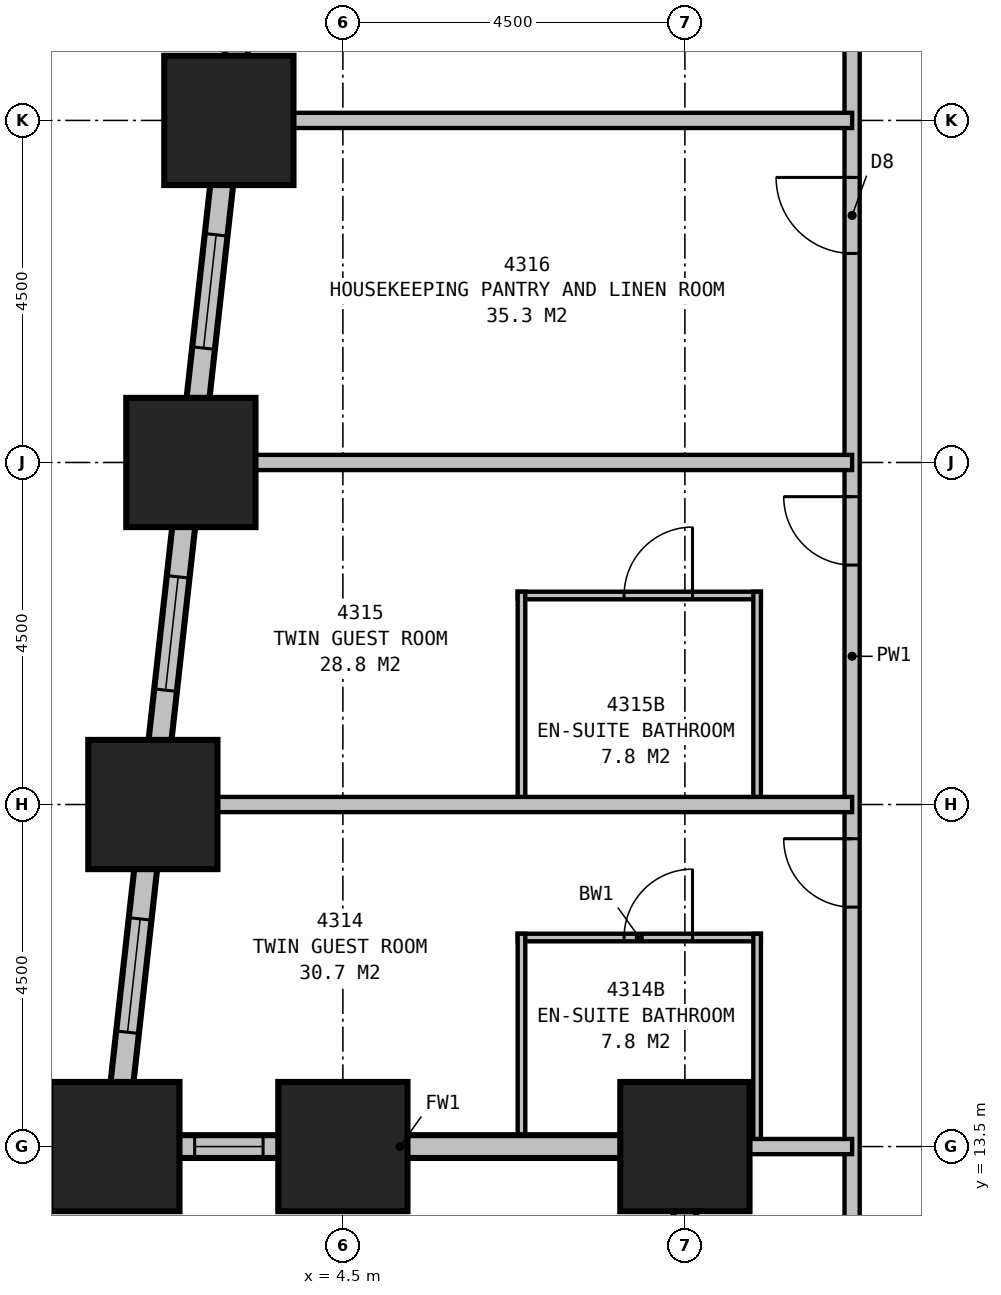
"""IFC4 building model, lengths in metres.
Left out: names, types, materials, properties, quantities, classifications, styles, units other than length and angle.
Written with IfcOpenShell. Run it as: python <this file> out.ifc"""

import sys

from ifc_helpers import new_model, si_unit, direction, frame, frame_2d, origin, origin_2d, place, context, subcontext, project, spatial, rectangle, extrude, element, fill, save


model = new_model("IFC4")
c1 = context("Model", 3, precision=1e-05, world=origin(), true_north=direction((0.0, 1.0)))
c2 = subcontext(c1, "Body", "Model", "MODEL_VIEW")
j1 = project(units=[si_unit("LENGTHUNIT", "METRE"), si_unit("PLANEANGLEUNIT", "RADIAN")], contexts=[c1])
p1 = place(None, origin())
s1 = spatial("IfcSite", under=j1, at=p1, CompositionType="ELEMENT")
p2 = place(p1, origin())
s2 = spatial("IfcBuilding", under=s1, at=p2, CompositionType="ELEMENT")
p3 = place(p2, frame((0.0, 0.0, 169.4)))
s3 = spatial("IfcBuildingStorey", under=s2, at=p3, CompositionType="ELEMENT", Elevation=169.4)
for number, where, z_axis, x_axis in (
    (1, (1.5, 13.5, 0.0), (0.0, 0.0, 1.0), (1.0, 0.0, 0.0)),
    (2, (4.5, 13.5, 0.0), (0.0, 0.0, 1.0), (1.0, 0.0, 0.0)),
    (3, (9.0, 13.5, 0.0), (0.0, 0.0, 1.0), (1.0, 0.0, 0.0)),
    (4, (3.0, 27.0, 0.0), (0.0, 0.0, 1.0), (1.0, 0.0, 0.0)),
    (5, (2.5, 22.5, 0.0), (0.0, 0.0, 1.0), (1.0, 0.0, 0.0)),
    (6, (2.0, 18.0, 0.0), (0.0, 0.0, 1.0), (1.0, 0.0, 0.0)),
):
    element("IfcColumn", number, at=place(p3, frame(where, z_axis=z_axis, x_axis=x_axis)), inside=s3, PredefinedType="COLUMN", context=c2, shape_type="SweptSolid", body=[
        extrude(rectangle(XDim=1.7, YDim=1.7, at=origin_2d()), origin(), (0.0, 0.0, 1.0), 3.5),
    ])
p4 = place(p3, frame((1.35, 13.5, 0.0), z_axis=(0.0, 0.0, 1.0), x_axis=(1.0, 0.0, 0.0)))
e7 = element("IfcWall", 7, at=p4, inside=s3, PredefinedType="STANDARD", context=c2, shape_type="SweptSolid", body=[
    extrude(rectangle(XDim=7.8, YDim=0.3, at=frame_2d((3.9, 0.0))), origin(), (0.0, 0.0, 1.0), 2.25),
])
p5 = place(p4, frame((1.2, 0.0, 0.5)))
e8 = element("IfcOpeningElement", 8, at=p5, cuts=e7, PredefinedType="OPENING", context=c2, shape_type="SweptSolid", body=[
    extrude(rectangle(XDim=0.9, YDim=1.6, at=frame_2d((0.45, 0.8))), frame((0.0, 0.16, 0.0), z_axis=(0.0, -1.0, 0.0), x_axis=(1.0, 0.0, 0.0)), (0.0, 0.0, 1.0), 0.32),
])
p6 = place(p3, frame((9.0, 13.65, 0.0), z_axis=(0.0, 0.0, 1.0), x_axis=(0.0, -1.0, 0.0)))
e9 = element("IfcWall", 9, at=p6, inside=s3, PredefinedType="STANDARD", context=c2, shape_type="SweptSolid", body=[
    extrude(rectangle(XDim=13.8, YDim=0.3, at=frame_2d((6.9, 0.0))), origin(), (0.0, 0.0, 1.0), 2.25),
])
p7 = place(p6, frame((1.2, 0.0, 0.5)))
e10 = element("IfcOpeningElement", 10, at=p7, cuts=e9, PredefinedType="OPENING", context=c2, shape_type="SweptSolid", body=[
    extrude(rectangle(XDim=2.4, YDim=1.6, at=frame_2d((1.2, 0.8))), frame((0.0, 0.16, 0.0), z_axis=(0.0, -1.0, 0.0), x_axis=(1.0, 0.0, 0.0)), (0.0, 0.0, 1.0), 0.32),
])
p8 = place(p6, frame((5.7, 0.0, 0.5)))
e11 = element("IfcOpeningElement", 11, at=p8, cuts=e9, PredefinedType="OPENING", context=c2, shape_type="SweptSolid", body=[
    extrude(rectangle(XDim=2.4, YDim=1.6, at=frame_2d((1.2, 0.8))), frame((0.0, 0.16, 0.0), z_axis=(0.0, -1.0, 0.0), x_axis=(1.0, 0.0, 0.0)), (0.0, 0.0, 1.0), 0.32),
])
p9 = place(p6, frame((10.2, 0.0, 0.5)))
e12 = element("IfcOpeningElement", 12, at=p9, cuts=e9, PredefinedType="OPENING", context=c2, shape_type="SweptSolid", body=[
    extrude(rectangle(XDim=2.4, YDim=1.6, at=frame_2d((1.2, 0.8))), frame((0.0, 0.16, 0.0), z_axis=(0.0, -1.0, 0.0), x_axis=(1.0, 0.0, 0.0)), (0.0, 0.0, 1.0), 0.32),
])
p10 = place(p3, frame((4.017, 36.149, 0.0), z_axis=(0.0, 0.0, 1.0), x_axis=(-0.110433862387, -0.993883475081, 0.0)))
e13 = element("IfcWall", 13, at=p10, inside=s3, PredefinedType="STANDARD", context=c2, shape_type="SweptSolid", body=[
    extrude(rectangle(XDim=22.939, YDim=0.3, at=frame_2d((11.469, 0.0))), origin(), (0.0, 0.0, 1.0), 2.25),
])
p11 = place(p10, frame((1.664, 0.0, 0.5)))
e14 = element("IfcOpeningElement", 14, at=p11, cuts=e13, PredefinedType="OPENING", context=c2, shape_type="SweptSolid", body=[
    extrude(rectangle(XDim=1.5, YDim=1.6, at=frame_2d((0.75, 0.8))), frame((0.0, 0.16, 0.0), z_axis=(0.0, -1.0, 0.0), x_axis=(1.0, 0.0, 0.0)), (0.0, 0.0, 1.0), 0.32),
])
p12 = place(p10, frame((6.192, 0.0, 0.5)))
e15 = element("IfcOpeningElement", 15, at=p12, cuts=e13, PredefinedType="OPENING", context=c2, shape_type="SweptSolid", body=[
    extrude(rectangle(XDim=1.5, YDim=1.6, at=frame_2d((0.75, 0.8))), frame((0.0, 0.16, 0.0), z_axis=(0.0, -1.0, 0.0), x_axis=(1.0, 0.0, 0.0)), (0.0, 0.0, 1.0), 0.32),
])
p13 = place(p10, frame((10.719, 0.0, 0.5)))
e16 = element("IfcOpeningElement", 16, at=p13, cuts=e13, PredefinedType="OPENING", context=c2, shape_type="SweptSolid", body=[
    extrude(rectangle(XDim=1.5, YDim=1.6, at=frame_2d((0.75, 0.8))), frame((0.0, 0.16, 0.0), z_axis=(0.0, -1.0, 0.0), x_axis=(1.0, 0.0, 0.0)), (0.0, 0.0, 1.0), 0.32),
])
p14 = place(p10, frame((15.247, 0.0, 0.5)))
e17 = element("IfcOpeningElement", 17, at=p14, cuts=e13, PredefinedType="OPENING", context=c2, shape_type="SweptSolid", body=[
    extrude(rectangle(XDim=1.5, YDim=1.6, at=frame_2d((0.75, 0.8))), frame((0.0, 0.16, 0.0), z_axis=(0.0, -1.0, 0.0), x_axis=(1.0, 0.0, 0.0)), (0.0, 0.0, 1.0), 0.32),
])
p15 = place(p10, frame((19.775, 0.0, 0.5)))
e18 = element("IfcOpeningElement", 18, at=p15, cuts=e13, PredefinedType="OPENING", context=c2, shape_type="SweptSolid", body=[
    extrude(rectangle(XDim=1.5, YDim=1.6, at=frame_2d((0.75, 0.8))), frame((0.0, 0.16, 0.0), z_axis=(0.0, -1.0, 0.0), x_axis=(1.0, 0.0, 0.0)), (0.0, 0.0, 1.0), 0.32),
])
p16 = place(p3, frame((11.2, 10.6, 0.0), z_axis=(0.0, 0.0, 1.0), x_axis=(0.0, 1.0, 0.0)))
e19 = element("IfcWall", 19, at=p16, inside=s3, PredefinedType="PARTITIONING", context=c2, shape_type="SweptSolid", body=[
    extrude(rectangle(XDim=18.7, YDim=0.2, at=frame_2d((9.35, 0.0))), origin(), (0.0, 0.0, 1.0), 3.25),
])
p17 = place(p16, frame((6.05, 0.0, 0.0)))
e20 = element("IfcOpeningElement", 20, at=p17, cuts=e19, PredefinedType="OPENING", context=c2, shape_type="SweptSolid", body=[
    extrude(rectangle(XDim=0.9, YDim=2.1, at=frame_2d((0.45, 1.05))), frame((0.0, 0.11, 0.0), z_axis=(0.0, -1.0, 0.0), x_axis=(1.0, 0.0, 0.0)), (0.0, 0.0, 1.0), 0.22),
])
p18 = place(p16, frame((10.55, 0.0, 0.0)))
e21 = element("IfcOpeningElement", 21, at=p18, cuts=e19, PredefinedType="OPENING", context=c2, shape_type="SweptSolid", body=[
    extrude(rectangle(XDim=0.9, YDim=2.1, at=frame_2d((0.45, 1.05))), frame((0.0, 0.11, 0.0), z_axis=(0.0, -1.0, 0.0), x_axis=(1.0, 0.0, 0.0)), (0.0, 0.0, 1.0), 0.22),
])
p19 = place(p16, frame((14.65, 0.0, 0.0)))
e22 = element("IfcOpeningElement", 22, at=p19, cuts=e19, PredefinedType="OPENING", context=c2, shape_type="SweptSolid", body=[
    extrude(rectangle(XDim=1.0, YDim=2.1, at=frame_2d((0.5, 1.05))), frame((0.0, 0.11, 0.0), z_axis=(0.0, -1.0, 0.0), x_axis=(1.0, 0.0, 0.0)), (0.0, 0.0, 1.0), 0.22),
])
p20 = place(p3, frame((11.2, 18.0, 0.0), z_axis=(0.0, 0.0, 1.0), x_axis=(-1.0, 0.0, 0.0)))
e23 = element("IfcWall", 23, at=p20, inside=s3, PredefinedType="PARTITIONING", context=c2, shape_type="SweptSolid", body=[
    extrude(rectangle(XDim=9.199, YDim=0.2, at=frame_2d((4.6, 0.0))), origin(), (0.0, 0.0, 1.0), 2.25),
])
p21 = place(p3, frame((11.2, 22.5, 0.0), z_axis=(0.0, 0.0, 1.0), x_axis=(-1.0, 0.0, 0.0)))
e24 = element("IfcWall", 24, at=p21, inside=s3, PredefinedType="PARTITIONING", context=c2, shape_type="SweptSolid", body=[
    extrude(rectangle(XDim=8.699, YDim=0.2, at=frame_2d((4.35, 0.0))), origin(), (0.0, 0.0, 1.0), 2.25),
])
for number, where, z_axis, x_axis in (
    (25, (9.95, 13.5, 0.0), (0.0, 0.0, 1.0), (0.0, 1.0, 0.0)),
    (26, (6.85, 13.5, 0.0), (0.0, 0.0, 1.0), (0.0, 1.0, 0.0)),
):
    element("IfcWall", number, at=place(p3, frame(where, z_axis=z_axis, x_axis=x_axis)), inside=s3, PredefinedType="PLUMBINGWALL", context=c2, shape_type="SweptSolid", body=[
        extrude(rectangle(XDim=2.8, YDim=0.1, at=frame_2d((1.4, 0.0))), origin(), (0.0, 0.0, 1.0), 3.25),
    ])
p22 = place(p3, frame((10.0, 16.25, 0.0), z_axis=(0.0, 0.0, 1.0), x_axis=(-1.0, 0.0, 0.0)))
e27 = element("IfcWall", 27, at=p22, inside=s3, PredefinedType="PLUMBINGWALL", context=c2, shape_type="SweptSolid", body=[
    extrude(rectangle(XDim=3.2, YDim=0.1, at=frame_2d((1.6, 0.0))), origin(), (0.0, 0.0, 1.0), 3.25),
])
p23 = place(p22, frame((1.8, 0.0, 0.0), z_axis=(0.0, 0.0, 1.0), x_axis=(-1.0, 0.0, 0.0)))
e28 = element("IfcOpeningElement", 28, at=p23, cuts=e27, PredefinedType="OPENING", context=c2, shape_type="SweptSolid", body=[
    extrude(rectangle(XDim=0.9, YDim=2.1, at=frame_2d((0.45, 1.05))), frame((0.0, 0.06, 0.0), z_axis=(0.0, -1.0, 0.0), x_axis=(1.0, 0.0, 0.0)), (0.0, 0.0, 1.0), 0.12),
])
for number, where, z_axis, x_axis in (
    (29, (9.95, 18.0, 0.0), (0.0, 0.0, 1.0), (0.0, 1.0, 0.0)),
    (30, (6.85, 18.0, 0.0), (0.0, 0.0, 1.0), (0.0, 1.0, 0.0)),
):
    element("IfcWall", number, at=place(p3, frame(where, z_axis=z_axis, x_axis=x_axis)), inside=s3, PredefinedType="PLUMBINGWALL", context=c2, shape_type="SweptSolid", body=[
        extrude(rectangle(XDim=2.8, YDim=0.1, at=frame_2d((1.4, 0.0))), origin(), (0.0, 0.0, 1.0), 3.25),
    ])
p24 = place(p3, frame((10.0, 20.75, 0.0), z_axis=(0.0, 0.0, 1.0), x_axis=(-1.0, 0.0, 0.0)))
e31 = element("IfcWall", 31, at=p24, inside=s3, PredefinedType="PLUMBINGWALL", context=c2, shape_type="SweptSolid", body=[
    extrude(rectangle(XDim=3.2, YDim=0.1, at=frame_2d((1.6, 0.0))), origin(), (0.0, 0.0, 1.0), 3.25),
])
p25 = place(p24, frame((1.8, 0.0, 0.0), z_axis=(0.0, 0.0, 1.0), x_axis=(-1.0, 0.0, 0.0)))
e32 = element("IfcOpeningElement", 32, at=p25, cuts=e31, PredefinedType="OPENING", context=c2, shape_type="SweptSolid", body=[
    extrude(rectangle(XDim=0.9, YDim=2.1, at=frame_2d((0.45, 1.05))), frame((0.0, 0.06, 0.0), z_axis=(0.0, -1.0, 0.0), x_axis=(1.0, 0.0, 0.0)), (0.0, 0.0, 1.0), 0.12),
])
p26 = place(p3, frame((11.2, 13.5, 0.0), z_axis=(0.0, 0.0, 1.0), x_axis=(-1.0, 0.0, 0.0)))
e33 = element("IfcWall", 33, at=p26, inside=s3, PredefinedType="PARTITIONING", context=c2, shape_type="SweptSolid", body=[
    extrude(rectangle(XDim=2.2, YDim=0.2, at=frame_2d((1.1, 0.0))), origin(), (0.0, 0.0, 1.0), 1.95),
])
p27 = place(p3, frame((11.2, 27.0, 0.0), z_axis=(0.0, 0.0, 1.0), x_axis=(-1.0, 0.0, 0.0)))
e34 = element("IfcWall", 34, at=p27, inside=s3, PredefinedType="PARTITIONING", context=c2, shape_type="SweptSolid", body=[
    extrude(rectangle(XDim=7.977, YDim=0.2, at=frame_2d((3.988, 0.0))), origin(), (0.0, 0.0, 1.0), 1.95),
])
p28 = place(p5, origin())
e35 = element("IfcWindow", 35, at=p28, inside=s3, PartitioningType="SINGLE_PANEL", PredefinedType="WINDOW", context=c2, shape_type="SweptSolid", body=[
    extrude(rectangle(XDim=0.9, YDim=1.6, at=frame_2d((0.45, 0.8))), frame((0.0, 0.03, 0.0), z_axis=(0.0, -1.0, 0.0), x_axis=(1.0, 0.0, 0.0)), (0.0, 0.0, 1.0), 0.06),
])
fill(e8, e35)
p29 = place(p13, origin())
e36 = element("IfcWindow", 36, at=p29, inside=s3, PartitioningType="SINGLE_PANEL", PredefinedType="WINDOW", context=c2, shape_type="SweptSolid", body=[
    extrude(rectangle(XDim=1.5, YDim=1.6, at=frame_2d((0.75, 0.8))), frame((0.0, 0.03, 0.0), z_axis=(0.0, -1.0, 0.0), x_axis=(1.0, 0.0, 0.0)), (0.0, 0.0, 1.0), 0.06),
])
fill(e16, e36)
p30 = place(p14, origin())
e37 = element("IfcWindow", 37, at=p30, inside=s3, PartitioningType="SINGLE_PANEL", PredefinedType="WINDOW", context=c2, shape_type="SweptSolid", body=[
    extrude(rectangle(XDim=1.5, YDim=1.6, at=frame_2d((0.75, 0.8))), frame((0.0, 0.03, 0.0), z_axis=(0.0, -1.0, 0.0), x_axis=(1.0, 0.0, 0.0)), (0.0, 0.0, 1.0), 0.06),
])
fill(e17, e37)
p31 = place(p15, origin())
e38 = element("IfcWindow", 38, at=p31, inside=s3, PartitioningType="SINGLE_PANEL", PredefinedType="WINDOW", context=c2, shape_type="SweptSolid", body=[
    extrude(rectangle(XDim=1.5, YDim=1.6, at=frame_2d((0.75, 0.8))), frame((0.0, 0.03, 0.0), z_axis=(0.0, -1.0, 0.0), x_axis=(1.0, 0.0, 0.0)), (0.0, 0.0, 1.0), 0.06),
])
fill(e18, e38)
p32 = place(p17, origin())
e39 = element("IfcDoor", 39, at=p32, inside=s3, OperationType="SINGLE_SWING_RIGHT", PredefinedType="DOOR", context=c2, shape_type="SweptSolid", body=[
    extrude(rectangle(XDim=0.9, YDim=2.1, at=frame_2d((0.45, 1.05))), frame((0.0, 0.025, 0.0), z_axis=(0.0, -1.0, 0.0), x_axis=(1.0, 0.0, 0.0)), (0.0, 0.0, 1.0), 0.05),
])
fill(e20, e39)
p33 = place(p18, origin())
e40 = element("IfcDoor", 40, at=p33, inside=s3, OperationType="SINGLE_SWING_RIGHT", PredefinedType="DOOR", context=c2, shape_type="SweptSolid", body=[
    extrude(rectangle(XDim=0.9, YDim=2.1, at=frame_2d((0.45, 1.05))), frame((0.0, 0.025, 0.0), z_axis=(0.0, -1.0, 0.0), x_axis=(1.0, 0.0, 0.0)), (0.0, 0.0, 1.0), 0.05),
])
fill(e21, e40)
p34 = place(p19, origin())
e41 = element("IfcDoor", 41, at=p34, inside=s3, OperationType="SINGLE_SWING_RIGHT", PredefinedType="DOOR", context=c2, shape_type="SweptSolid", body=[
    extrude(rectangle(XDim=1.0, YDim=2.1, at=frame_2d((0.5, 1.05))), frame((0.0, 0.025, 0.0), z_axis=(0.0, -1.0, 0.0), x_axis=(1.0, 0.0, 0.0)), (0.0, 0.0, 1.0), 0.05),
])
fill(e22, e41)
p35 = place(p23, origin())
e42 = element("IfcDoor", 42, at=p35, inside=s3, OperationType="SINGLE_SWING_RIGHT", PredefinedType="DOOR", context=c2, shape_type="SweptSolid", body=[
    extrude(rectangle(XDim=0.9, YDim=2.1, at=frame_2d((0.45, 1.05))), frame((0.0, 0.025, 0.0), z_axis=(0.0, -1.0, 0.0), x_axis=(1.0, 0.0, 0.0)), (0.0, 0.0, 1.0), 0.05),
])
fill(e28, e42)
p36 = place(p25, origin())
e43 = element("IfcDoor", 43, at=p36, inside=s3, OperationType="SINGLE_SWING_RIGHT", PredefinedType="DOOR", context=c2, shape_type="SweptSolid", body=[
    extrude(rectangle(XDim=0.9, YDim=2.1, at=frame_2d((0.45, 1.05))), frame((0.0, 0.025, 0.0), z_axis=(0.0, -1.0, 0.0), x_axis=(1.0, 0.0, 0.0)), (0.0, 0.0, 1.0), 0.05),
])
fill(e32, e43)
save(model, sys.argv[1])
